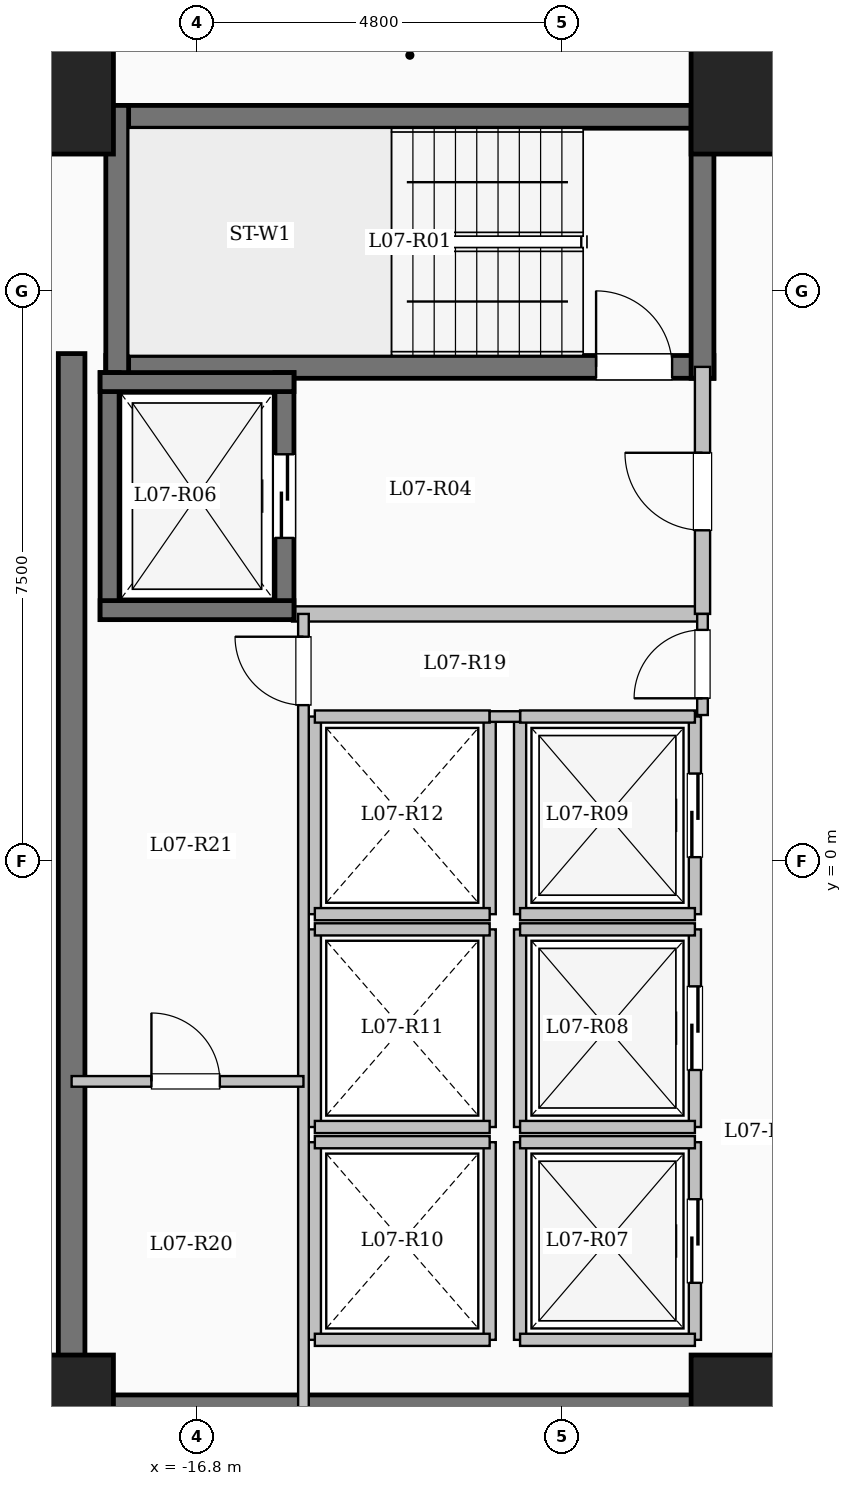
"""IFC4 building model, lengths in metres.
Left out: names, types, materials, properties, quantities, classifications, styles, units other than length and angle.
Written with IfcOpenShell. Run it as: python <this file> out.ifc"""

import sys

from ifc_helpers import new_model, si_unit, direction, frame, frame_2d, origin, origin_2d, place, context, subcontext, project, spatial, rectangle, extrude, element, fill, save


model = new_model("IFC4")
c1 = context("Model", 3, precision=1e-05, world=origin(), true_north=direction((0.0, 1.0)))
c2 = subcontext(c1, "Body", "Model", "MODEL_VIEW")
j1 = project(units=[si_unit("LENGTHUNIT", "METRE"), si_unit("PLANEANGLEUNIT", "RADIAN")], contexts=[c1])
p1 = place(None, origin())
s1 = spatial("IfcSite", under=j1, at=p1, CompositionType="ELEMENT")
p2 = place(p1, origin())
s2 = spatial("IfcBuilding", under=s1, at=p2, CompositionType="ELEMENT")
p3 = place(p2, frame((0.0, 0.0, 30.7)))
s3 = spatial("IfcBuildingStorey", under=s2, at=p3, CompositionType="ELEMENT", Elevation=30.7)
for number, where, z_axis, x_axis in (
    (1, (-9.6, -7.2, 0.0), (0.0, 0.0, 1.0), (1.0, 0.0, 0.0)),
    (2, (-9.6, 10.0, 0.0), (0.0, 0.0, 1.0), (1.0, 0.0, 0.0)),
    (3, (-18.6, -7.2, 0.0), (0.0, 0.0, 1.0), (1.0, 0.0, 0.0)),
    (4, (-18.6, 10.0, 0.0), (0.0, 0.0, 1.0), (1.0, 0.0, 0.0)),
):
    element("IfcColumn", number, at=place(p3, frame(where, z_axis=z_axis, x_axis=x_axis)), inside=s3, PredefinedType="COLUMN", context=c2, shape_type="SweptSolid", body=[
        extrude(rectangle(XDim=1.4, YDim=1.4, at=origin_2d()), origin(), (0.0, 0.0, 1.0), 3.35),
    ])
p4 = place(p3, frame((-18.0, 9.79, 0.0), z_axis=(0.0, 0.0, 1.0), x_axis=(1.0, 0.0, 0.0)))
e5 = element("IfcWall", 5, at=p4, inside=s3, PredefinedType="SHEAR", context=c2, shape_type="SweptSolid", body=[
    extrude(rectangle(XDim=8.0, YDim=0.3, at=frame_2d((4.0, 0.0))), origin(), (0.0, 0.0, 1.0), 3.35),
])
p5 = place(p3, frame((-18.0, 6.5, 0.0), z_axis=(0.0, 0.0, 1.0), x_axis=(1.0, 0.0, 0.0)))
e6 = element("IfcWall", 6, at=p5, inside=s3, PredefinedType="SHEAR", context=c2, shape_type="SweptSolid", body=[
    extrude(rectangle(XDim=8.0, YDim=0.3, at=frame_2d((4.0, 0.0))), origin(), (0.0, 0.0, 1.0), 3.35),
])
p6 = place(p5, frame((6.45, 0.0, 0.0)))
e7 = element("IfcOpeningElement", 7, at=p6, cuts=e6, PredefinedType="OPENING", context=c2, shape_type="SweptSolid", body=[
    extrude(rectangle(XDim=1.0, YDim=2.15, at=frame_2d((0.5, 1.075))), frame((0.0, 0.16, 0.0), z_axis=(0.0, -1.0, 0.0), x_axis=(1.0, 0.0, 0.0)), (0.0, 0.0, 1.0), 0.32),
])
for number, where, z_axis, x_axis in (
    (8, (-17.85, 6.35, 0.0), (0.0, 0.0, 1.0), (0.0, 1.0, 0.0)),
    (9, (-10.15, 6.35, 0.0), (0.0, 0.0, 1.0), (0.0, 1.0, 0.0)),
):
    element("IfcWall", number, at=place(p3, frame(where, z_axis=z_axis, x_axis=x_axis)), inside=s3, PredefinedType="SHEAR", context=c2, shape_type="SweptSolid", body=[
        extrude(rectangle(XDim=3.59, YDim=0.3, at=frame_2d((1.795, 0.0))), origin(), (0.0, 0.0, 1.0), 3.35),
    ])
p7 = place(p3, frame((-15.55, 3.25, 0.0), z_axis=(0.0, 0.0, 1.0), x_axis=(1.0, 0.0, 0.0)))
e10 = element("IfcWall", 10, at=p7, inside=s3, PredefinedType="SOLIDWALL", context=c2, shape_type="SweptSolid", body=[
    extrude(rectangle(XDim=5.4, YDim=0.2, at=frame_2d((2.7, 0.0))), origin(), (0.0, 0.0, 1.0), 3.1),
])
p8 = place(p3, frame((-10.15, 3.25, 0.0), z_axis=(0.0, 0.0, 1.0), x_axis=(0.0, 1.0, 0.0)))
e11 = element("IfcWall", 11, at=p8, inside=s3, PredefinedType="SOLIDWALL", context=c2, shape_type="SweptSolid", body=[
    extrude(rectangle(XDim=3.25, YDim=0.2, at=frame_2d((1.625, 0.0))), origin(), (0.0, 0.0, 1.0), 3.1),
])
p9 = place(p8, frame((1.1, 0.0, 0.0)))
e12 = element("IfcOpeningElement", 12, at=p9, cuts=e11, PredefinedType="OPENING", context=c2, shape_type="SweptSolid", body=[
    extrude(rectangle(XDim=1.02, YDim=2.15, at=frame_2d((0.51, 1.075))), frame((0.0, 0.11, 0.0), z_axis=(0.0, -1.0, 0.0), x_axis=(1.0, 0.0, 0.0)), (0.0, 0.0, 1.0), 0.22),
])
p10 = place(p3, frame((-17.95, 3.175, 0.0), z_axis=(0.0, 0.0, 1.0), x_axis=(0.0, 1.0, 0.0)))
e13 = element("IfcWall", 13, at=p10, inside=s3, PredefinedType="SHEAR", context=c2, shape_type="SweptSolid", body=[
    extrude(rectangle(XDim=3.25, YDim=0.25, at=frame_2d((1.625, 0.0))), origin(), (0.0, 0.0, 1.0), 3.35),
])
p11 = place(p3, frame((-15.65, 3.175, 0.0), z_axis=(0.0, 0.0, 1.0), x_axis=(0.0, 1.0, 0.0)))
e14 = element("IfcWall", 14, at=p11, inside=s3, PredefinedType="SHEAR", context=c2, shape_type="SweptSolid", body=[
    extrude(rectangle(XDim=3.25, YDim=0.25, at=frame_2d((1.625, 0.0))), origin(), (0.0, 0.0, 1.0), 3.35),
])
p12 = place(p11, frame((1.075, 0.0, 0.0)))
e15 = element("IfcOpeningElement", 15, at=p12, cuts=e14, PredefinedType="OPENING", context=c2, shape_type="SweptSolid", body=[
    extrude(rectangle(XDim=1.1, YDim=2.15, at=frame_2d((0.55, 1.075))), frame((0.0, 0.135, 0.0), z_axis=(0.0, -1.0, 0.0), x_axis=(1.0, 0.0, 0.0)), (0.0, 0.0, 1.0), 0.27),
])
for number, where, z_axis, x_axis in (
    (16, (-18.075, 3.3, 0.0), (0.0, 0.0, 1.0), (1.0, 0.0, 0.0)),
    (17, (-18.075, 6.3, 0.0), (0.0, 0.0, 1.0), (1.0, 0.0, 0.0)),
):
    element("IfcWall", number, at=place(p3, frame(where, z_axis=z_axis, x_axis=x_axis)), inside=s3, PredefinedType="SHEAR", context=c2, shape_type="SweptSolid", body=[
        extrude(rectangle(XDim=2.55, YDim=0.25, at=frame_2d((1.275, 0.0))), origin(), (0.0, 0.0, 1.0), 3.35),
    ])
p13 = place(p3, frame((-12.55, -6.3, 0.0), z_axis=(0.0, 0.0, 1.0), x_axis=(0.0, 1.0, 0.0)))
e18 = element("IfcWall", 18, at=p13, inside=s3, PredefinedType="SOLIDWALL", context=c2, shape_type="SweptSolid", body=[
    extrude(rectangle(XDim=2.6, YDim=0.16, at=frame_2d((1.3, 0.0))), origin(), (0.0, 0.0, 1.0), 3.1),
])
p14 = place(p3, frame((-10.25, -6.3, 0.0), z_axis=(0.0, 0.0, 1.0), x_axis=(0.0, 1.0, 0.0)))
e19 = element("IfcWall", 19, at=p14, inside=s3, PredefinedType="SOLIDWALL", context=c2, shape_type="SweptSolid", body=[
    extrude(rectangle(XDim=2.6, YDim=0.16, at=frame_2d((1.3, 0.0))), origin(), (0.0, 0.0, 1.0), 3.1),
])
p15 = place(p14, frame((0.75, 0.0, 0.0)))
e20 = element("IfcOpeningElement", 20, at=p15, cuts=e19, PredefinedType="OPENING", context=c2, shape_type="SweptSolid", body=[
    extrude(rectangle(XDim=1.1, YDim=2.15, at=frame_2d((0.55, 1.075))), frame((0.0, 0.09, 0.0), z_axis=(0.0, -1.0, 0.0), x_axis=(1.0, 0.0, 0.0)), (0.0, 0.0, 1.0), 0.18),
])
for number, where, z_axis, x_axis in (
    (21, (-12.55, -6.3, 0.0), (0.0, 0.0, 1.0), (1.0, 0.0, 0.0)),
    (22, (-12.55, -3.7, 0.0), (0.0, 0.0, 1.0), (1.0, 0.0, 0.0)),
):
    element("IfcWall", number, at=place(p3, frame(where, z_axis=z_axis, x_axis=x_axis)), inside=s3, PredefinedType="SOLIDWALL", context=c2, shape_type="SweptSolid", body=[
        extrude(rectangle(XDim=2.3, YDim=0.16, at=frame_2d((1.15, 0.0))), origin(), (0.0, 0.0, 1.0), 3.1),
    ])
p16 = place(p3, frame((-12.55, -3.5, 0.0), z_axis=(0.0, 0.0, 1.0), x_axis=(0.0, 1.0, 0.0)))
e23 = element("IfcWall", 23, at=p16, inside=s3, PredefinedType="SOLIDWALL", context=c2, shape_type="SweptSolid", body=[
    extrude(rectangle(XDim=2.6, YDim=0.16, at=frame_2d((1.3, 0.0))), origin(), (0.0, 0.0, 1.0), 3.1),
])
p17 = place(p3, frame((-10.25, -3.5, 0.0), z_axis=(0.0, 0.0, 1.0), x_axis=(0.0, 1.0, 0.0)))
e24 = element("IfcWall", 24, at=p17, inside=s3, PredefinedType="SOLIDWALL", context=c2, shape_type="SweptSolid", body=[
    extrude(rectangle(XDim=2.6, YDim=0.16, at=frame_2d((1.3, 0.0))), origin(), (0.0, 0.0, 1.0), 3.1),
])
p18 = place(p17, frame((0.75, 0.0, 0.0)))
e25 = element("IfcOpeningElement", 25, at=p18, cuts=e24, PredefinedType="OPENING", context=c2, shape_type="SweptSolid", body=[
    extrude(rectangle(XDim=1.1, YDim=2.15, at=frame_2d((0.55, 1.075))), frame((0.0, 0.09, 0.0), z_axis=(0.0, -1.0, 0.0), x_axis=(1.0, 0.0, 0.0)), (0.0, 0.0, 1.0), 0.18),
])
for number, where, z_axis, x_axis in (
    (26, (-12.55, -3.5, 0.0), (0.0, 0.0, 1.0), (1.0, 0.0, 0.0)),
    (27, (-12.55, -0.9, 0.0), (0.0, 0.0, 1.0), (1.0, 0.0, 0.0)),
):
    element("IfcWall", number, at=place(p3, frame(where, z_axis=z_axis, x_axis=x_axis)), inside=s3, PredefinedType="SOLIDWALL", context=c2, shape_type="SweptSolid", body=[
        extrude(rectangle(XDim=2.3, YDim=0.16, at=frame_2d((1.15, 0.0))), origin(), (0.0, 0.0, 1.0), 3.1),
    ])
p19 = place(p3, frame((-12.55, -0.7, 0.0), z_axis=(0.0, 0.0, 1.0), x_axis=(0.0, 1.0, 0.0)))
e28 = element("IfcWall", 28, at=p19, inside=s3, PredefinedType="SOLIDWALL", context=c2, shape_type="SweptSolid", body=[
    extrude(rectangle(XDim=2.6, YDim=0.16, at=frame_2d((1.3, 0.0))), origin(), (0.0, 0.0, 1.0), 3.1),
])
p20 = place(p3, frame((-10.25, -0.7, 0.0), z_axis=(0.0, 0.0, 1.0), x_axis=(0.0, 1.0, 0.0)))
e29 = element("IfcWall", 29, at=p20, inside=s3, PredefinedType="SOLIDWALL", context=c2, shape_type="SweptSolid", body=[
    extrude(rectangle(XDim=2.6, YDim=0.16, at=frame_2d((1.3, 0.0))), origin(), (0.0, 0.0, 1.0), 3.1),
])
p21 = place(p20, frame((0.75, 0.0, 0.0)))
e30 = element("IfcOpeningElement", 30, at=p21, cuts=e29, PredefinedType="OPENING", context=c2, shape_type="SweptSolid", body=[
    extrude(rectangle(XDim=1.1, YDim=2.15, at=frame_2d((0.55, 1.075))), frame((0.0, 0.09, 0.0), z_axis=(0.0, -1.0, 0.0), x_axis=(1.0, 0.0, 0.0)), (0.0, 0.0, 1.0), 0.18),
])
for number, where, z_axis, x_axis in (
    (31, (-12.55, -0.7, 0.0), (0.0, 0.0, 1.0), (1.0, 0.0, 0.0)),
    (32, (-12.55, 1.9, 0.0), (0.0, 0.0, 1.0), (1.0, 0.0, 0.0)),
):
    element("IfcWall", number, at=place(p3, frame(where, z_axis=z_axis, x_axis=x_axis)), inside=s3, PredefinedType="SOLIDWALL", context=c2, shape_type="SweptSolid", body=[
        extrude(rectangle(XDim=2.3, YDim=0.16, at=frame_2d((1.15, 0.0))), origin(), (0.0, 0.0, 1.0), 3.1),
    ])
for number, where, z_axis, x_axis in (
    (33, (-15.25, -6.3, 0.0), (0.0, 0.0, 1.0), (0.0, 1.0, 0.0)),
    (34, (-12.95, -6.3, 0.0), (0.0, 0.0, 1.0), (0.0, 1.0, 0.0)),
):
    element("IfcWall", number, at=place(p3, frame(where, z_axis=z_axis, x_axis=x_axis)), inside=s3, PredefinedType="SOLIDWALL", context=c2, shape_type="SweptSolid", body=[
        extrude(rectangle(XDim=2.6, YDim=0.16, at=frame_2d((1.3, 0.0))), origin(), (0.0, 0.0, 1.0), 3.1),
    ])
for number, where, z_axis, x_axis in (
    (35, (-15.25, -6.3, 0.0), (0.0, 0.0, 1.0), (1.0, 0.0, 0.0)),
    (36, (-15.25, -3.7, 0.0), (0.0, 0.0, 1.0), (1.0, 0.0, 0.0)),
):
    element("IfcWall", number, at=place(p3, frame(where, z_axis=z_axis, x_axis=x_axis)), inside=s3, PredefinedType="SOLIDWALL", context=c2, shape_type="SweptSolid", body=[
        extrude(rectangle(XDim=2.3, YDim=0.16, at=frame_2d((1.15, 0.0))), origin(), (0.0, 0.0, 1.0), 3.1),
    ])
for number, where, z_axis, x_axis in (
    (37, (-15.25, -3.5, 0.0), (0.0, 0.0, 1.0), (0.0, 1.0, 0.0)),
    (38, (-12.95, -3.5, 0.0), (0.0, 0.0, 1.0), (0.0, 1.0, 0.0)),
):
    element("IfcWall", number, at=place(p3, frame(where, z_axis=z_axis, x_axis=x_axis)), inside=s3, PredefinedType="SOLIDWALL", context=c2, shape_type="SweptSolid", body=[
        extrude(rectangle(XDim=2.6, YDim=0.16, at=frame_2d((1.3, 0.0))), origin(), (0.0, 0.0, 1.0), 3.1),
    ])
for number, where, z_axis, x_axis in (
    (39, (-15.25, -3.5, 0.0), (0.0, 0.0, 1.0), (1.0, 0.0, 0.0)),
    (40, (-15.25, -0.9, 0.0), (0.0, 0.0, 1.0), (1.0, 0.0, 0.0)),
):
    element("IfcWall", number, at=place(p3, frame(where, z_axis=z_axis, x_axis=x_axis)), inside=s3, PredefinedType="SOLIDWALL", context=c2, shape_type="SweptSolid", body=[
        extrude(rectangle(XDim=2.3, YDim=0.16, at=frame_2d((1.15, 0.0))), origin(), (0.0, 0.0, 1.0), 3.1),
    ])
for number, where, z_axis, x_axis in (
    (41, (-15.25, -0.7, 0.0), (0.0, 0.0, 1.0), (0.0, 1.0, 0.0)),
    (42, (-12.95, -0.7, 0.0), (0.0, 0.0, 1.0), (0.0, 1.0, 0.0)),
):
    element("IfcWall", number, at=place(p3, frame(where, z_axis=z_axis, x_axis=x_axis)), inside=s3, PredefinedType="SOLIDWALL", context=c2, shape_type="SweptSolid", body=[
        extrude(rectangle(XDim=2.6, YDim=0.16, at=frame_2d((1.3, 0.0))), origin(), (0.0, 0.0, 1.0), 3.1),
    ])
for number, where, z_axis, x_axis in (
    (43, (-15.25, -0.7, 0.0), (0.0, 0.0, 1.0), (1.0, 0.0, 0.0)),
    (44, (-15.25, 1.9, 0.0), (0.0, 0.0, 1.0), (1.0, 0.0, 0.0)),
):
    element("IfcWall", number, at=place(p3, frame(where, z_axis=z_axis, x_axis=x_axis)), inside=s3, PredefinedType="SOLIDWALL", context=c2, shape_type="SweptSolid", body=[
        extrude(rectangle(XDim=2.3, YDim=0.16, at=frame_2d((1.15, 0.0))), origin(), (0.0, 0.0, 1.0), 3.1),
    ])
p22 = place(p3, frame((-18.45, -7.375, 0.0), z_axis=(0.0, 0.0, 1.0), x_axis=(0.0, 1.0, 0.0)))
e45 = element("IfcWall", 45, at=p22, inside=s3, PredefinedType="SHEAR", context=c2, shape_type="SweptSolid", body=[
    extrude(rectangle(XDim=14.05, YDim=0.35, at=frame_2d((7.025, 0.0))), origin(), (0.0, 0.0, 1.0), 3.35),
])
p23 = place(p3, frame((-18.625, -7.2, 0.0), z_axis=(0.0, 0.0, 1.0), x_axis=(1.0, 0.0, 0.0)))
e46 = element("IfcWall", 46, at=p23, inside=s3, PredefinedType="SHEAR", context=c2, shape_type="SweptSolid", body=[
    extrude(rectangle(XDim=8.55, YDim=0.35, at=frame_2d((4.275, 0.0))), origin(), (0.0, 0.0, 1.0), 3.35),
])
p24 = place(p3, frame((-12.95, 1.9, 0.0), z_axis=(0.0, 0.0, 1.0), x_axis=(1.0, 0.0, 0.0)))
e47 = element("IfcWall", 47, at=p24, inside=s3, PredefinedType="PARTITIONING", context=c2, shape_type="SweptSolid", body=[
    extrude(rectangle(XDim=0.4, YDim=0.14, at=frame_2d((0.2, 0.0))), origin(), (0.0, 0.0, 1.0), 3.1),
])
p25 = place(p3, frame((-10.15, 1.92, 0.0), z_axis=(0.0, 0.0, 1.0), x_axis=(0.0, 1.0, 0.0)))
e48 = element("IfcWall", 48, at=p25, inside=s3, PredefinedType="PARTITIONING", context=c2, shape_type="SweptSolid", body=[
    extrude(rectangle(XDim=1.33, YDim=0.14, at=frame_2d((0.665, 0.0))), origin(), (0.0, 0.0, 1.0), 3.1),
])
p26 = place(p25, frame((0.22, 0.0, 0.0)))
e49 = element("IfcOpeningElement", 49, at=p26, cuts=e48, PredefinedType="OPENING", context=c2, shape_type="SweptSolid", body=[
    extrude(rectangle(XDim=0.9, YDim=2.08, at=frame_2d((0.45, 1.04))), frame((0.0, 0.08, 0.0), z_axis=(0.0, -1.0, 0.0), x_axis=(1.0, 0.0, 0.0)), (0.0, 0.0, 1.0), 0.16),
])
p27 = place(p3, frame((-15.4, -7.2, 0.0), z_axis=(0.0, 0.0, 1.0), x_axis=(0.0, 1.0, 0.0)))
e50 = element("IfcWall", 50, at=p27, inside=s3, PredefinedType="PARTITIONING", context=c2, shape_type="SweptSolid", body=[
    extrude(rectangle(XDim=10.45, YDim=0.14, at=frame_2d((5.225, 0.0))), origin(), (0.0, 0.0, 1.0), 3.1),
])
p28 = place(p27, frame((9.25, 0.0, 0.0)))
e51 = element("IfcOpeningElement", 51, at=p28, cuts=e50, PredefinedType="OPENING", context=c2, shape_type="SweptSolid", body=[
    extrude(rectangle(XDim=0.9, YDim=2.08, at=frame_2d((0.45, 1.04))), frame((0.0, 0.08, 0.0), z_axis=(0.0, -1.0, 0.0), x_axis=(1.0, 0.0, 0.0)), (0.0, 0.0, 1.0), 0.16),
])
p29 = place(p3, frame((-18.45, -2.9, 0.0), z_axis=(0.0, 0.0, 1.0), x_axis=(1.0, 0.0, 0.0)))
e52 = element("IfcWall", 52, at=p29, inside=s3, PredefinedType="PARTITIONING", context=c2, shape_type="SweptSolid", body=[
    extrude(rectangle(XDim=3.05, YDim=0.14, at=frame_2d((1.525, 0.0))), origin(), (0.0, 0.0, 1.0), 3.1),
])
p30 = place(p29, frame((1.05, 0.0, 0.0)))
e53 = element("IfcOpeningElement", 53, at=p30, cuts=e52, PredefinedType="OPENING", context=c2, shape_type="SweptSolid", body=[
    extrude(rectangle(XDim=0.9, YDim=2.08, at=frame_2d((0.45, 1.04))), frame((0.0, 0.08, 0.0), z_axis=(0.0, -1.0, 0.0), x_axis=(1.0, 0.0, 0.0)), (0.0, 0.0, 1.0), 0.16),
])
p31 = place(p3, frame((-28.68, -7.25, 0.0), z_axis=(0.0, 0.0, 1.0), x_axis=(1.0, 0.0, 0.0)))
e54 = element("IfcWall", 54, at=p31, inside=s3, PredefinedType="PARTITIONING", context=c2, shape_type="SweptSolid", body=[
    extrude(rectangle(XDim=10.23, YDim=0.15, at=frame_2d((5.115, 0.0))), origin(), (0.0, 0.0, 1.0), 3.1),
])
p32 = place(p31, frame((7.03, 0.0, 0.0)))
e55 = element("IfcOpeningElement", 55, at=p32, cuts=e54, PredefinedType="OPENING", context=c2, shape_type="SweptSolid", body=[
    extrude(rectangle(XDim=1.08, YDim=2.15, at=frame_2d((0.54, 1.075))), frame((0.0, 0.085, 0.0), z_axis=(0.0, -1.0, 0.0), x_axis=(1.0, 0.0, 0.0)), (0.0, 0.0, 1.0), 0.17),
])
p33 = place(p6, origin())
e56 = element("IfcDoor", 56, at=p33, inside=s3, OperationType="SINGLE_SWING_LEFT", PredefinedType="DOOR", context=c2, shape_type="SweptSolid", body=[
    extrude(rectangle(XDim=1.0, YDim=2.15, at=frame_2d((0.5, 1.075))), frame((0.0, 0.025, 0.0), z_axis=(0.0, -1.0, 0.0), x_axis=(1.0, 0.0, 0.0)), (0.0, 0.0, 1.0), 0.05),
])
fill(e7, e56)
p34 = place(p9, origin())
e57 = element("IfcDoor", 57, at=p34, inside=s3, OperationType="SINGLE_SWING_RIGHT", PredefinedType="DOOR", context=c2, shape_type="SweptSolid", body=[
    extrude(rectangle(XDim=1.02, YDim=2.15, at=frame_2d((0.51, 1.075))), frame((0.0, 0.025, 0.0), z_axis=(0.0, -1.0, 0.0), x_axis=(1.0, 0.0, 0.0)), (0.0, 0.0, 1.0), 0.05),
])
fill(e12, e57)
p35 = place(p12, origin())
e58 = element("IfcDoor", 58, at=p35, inside=s3, OperationType="SLIDING_TO_LEFT", PredefinedType="DOOR", context=c2, shape_type="SweptSolid", body=[
    extrude(rectangle(XDim=1.1, YDim=2.15, at=frame_2d((0.55, 1.075))), frame((0.0, 0.025, 0.0), z_axis=(0.0, -1.0, 0.0), x_axis=(1.0, 0.0, 0.0)), (0.0, 0.0, 1.0), 0.05),
])
fill(e15, e58)
p36 = place(p15, origin())
e59 = element("IfcDoor", 59, at=p36, inside=s3, OperationType="SLIDING_TO_LEFT", PredefinedType="DOOR", context=c2, shape_type="SweptSolid", body=[
    extrude(rectangle(XDim=1.1, YDim=2.15, at=frame_2d((0.55, 1.075))), frame((0.0, 0.025, 0.0), z_axis=(0.0, -1.0, 0.0), x_axis=(1.0, 0.0, 0.0)), (0.0, 0.0, 1.0), 0.05),
])
fill(e20, e59)
p37 = place(p18, origin())
e60 = element("IfcDoor", 60, at=p37, inside=s3, OperationType="SLIDING_TO_LEFT", PredefinedType="DOOR", context=c2, shape_type="SweptSolid", body=[
    extrude(rectangle(XDim=1.1, YDim=2.15, at=frame_2d((0.55, 1.075))), frame((0.0, 0.025, 0.0), z_axis=(0.0, -1.0, 0.0), x_axis=(1.0, 0.0, 0.0)), (0.0, 0.0, 1.0), 0.05),
])
fill(e25, e60)
p38 = place(p21, origin())
e61 = element("IfcDoor", 61, at=p38, inside=s3, OperationType="SLIDING_TO_LEFT", PredefinedType="DOOR", context=c2, shape_type="SweptSolid", body=[
    extrude(rectangle(XDim=1.1, YDim=2.15, at=frame_2d((0.55, 1.075))), frame((0.0, 0.025, 0.0), z_axis=(0.0, -1.0, 0.0), x_axis=(1.0, 0.0, 0.0)), (0.0, 0.0, 1.0), 0.05),
])
fill(e30, e61)
p39 = place(p26, origin())
e62 = element("IfcDoor", 62, at=p39, inside=s3, OperationType="SINGLE_SWING_LEFT", PredefinedType="DOOR", context=c2, shape_type="SweptSolid", body=[
    extrude(rectangle(XDim=0.9, YDim=2.08, at=frame_2d((0.45, 1.04))), frame((0.0, 0.025, 0.0), z_axis=(0.0, -1.0, 0.0), x_axis=(1.0, 0.0, 0.0)), (0.0, 0.0, 1.0), 0.05),
])
fill(e49, e62)
p40 = place(p28, origin())
e63 = element("IfcDoor", 63, at=p40, inside=s3, OperationType="SINGLE_SWING_RIGHT", PredefinedType="DOOR", context=c2, shape_type="SweptSolid", body=[
    extrude(rectangle(XDim=0.9, YDim=2.08, at=frame_2d((0.45, 1.04))), frame((0.0, 0.025, 0.0), z_axis=(0.0, -1.0, 0.0), x_axis=(1.0, 0.0, 0.0)), (0.0, 0.0, 1.0), 0.05),
])
fill(e51, e63)
p41 = place(p30, origin())
e64 = element("IfcDoor", 64, at=p41, inside=s3, OperationType="SINGLE_SWING_LEFT", PredefinedType="DOOR", context=c2, shape_type="SweptSolid", body=[
    extrude(rectangle(XDim=0.9, YDim=2.08, at=frame_2d((0.45, 1.04))), frame((0.0, 0.025, 0.0), z_axis=(0.0, -1.0, 0.0), x_axis=(1.0, 0.0, 0.0)), (0.0, 0.0, 1.0), 0.05),
])
fill(e53, e64)
save(model, sys.argv[1])
